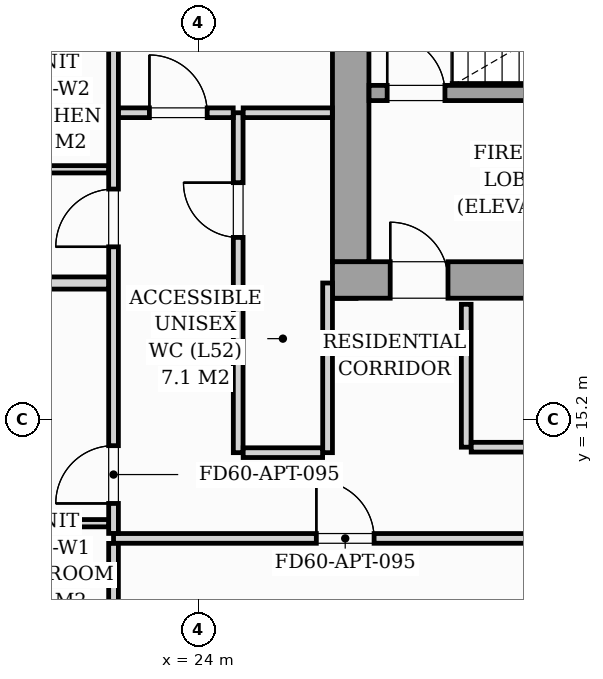
"""IFC4 building model, lengths in metres.
Left out: names, types, materials, properties, quantities, classifications, styles, units other than length and angle.
Written with IfcOpenShell. Run it as: python <this file> out.ifc"""

import sys

from ifc_helpers import new_model, si_unit, direction, frame, frame_2d, origin, origin_2d, place, context, subcontext, project, spatial, rectangle, i_section, extrude, source, transform, mapped, element, fill, save


model = new_model("IFC4")
c1 = context("Model", 3, precision=1e-05, world=origin(), true_north=direction((0.0, 1.0)))
c2 = subcontext(c1, "Body", "Model", "MODEL_VIEW")
j1 = project(units=[si_unit("LENGTHUNIT", "METRE"), si_unit("PLANEANGLEUNIT", "RADIAN")], contexts=[c1])
p1 = place(None, origin())
s1 = spatial("IfcSite", under=j1, at=p1, CompositionType="ELEMENT")
p2 = place(p1, origin())
s2 = spatial("IfcBuilding", under=s1, at=p2, CompositionType="ELEMENT")
p3 = place(p2, frame((0.0, 0.0, 182.6)))
s3 = spatial("IfcBuildingStorey", under=s2, at=p3, CompositionType="ELEMENT", Elevation=182.6)
m1 = source(origin(), c2, "Body", "SweptSolid", [
    extrude(i_section(OverallWidth=0.416, OverallDepth=0.446, WebThickness=0.039, FlangeThickness=0.063, FilletRadius=0.018, at=origin_2d()), origin(), (0.0, 0.0, 1.0), 3.196),
])
p4 = place(p3, frame((26.4, 17.4, 0.002), z_axis=(0.0, 0.0, 1.0), x_axis=(1.0, 0.0, 0.0)))
e1 = element("IfcColumn", 1, at=p4, inside=s3, PredefinedType="PILASTER", context=c2, shape_type="MappedRepresentation", body=[
    mapped(m1, transform((0.0, 0.0, 0.0), scale=1.0)),
])
p5 = place(p3, frame((26.2, 17.5, 0.0), z_axis=(0.0, 0.0, 1.0), x_axis=(1.0, 0.0, 0.0)))
e2 = element("IfcWall", 2, at=p5, inside=s3, PredefinedType="SHEAR", context=c2, shape_type="SweptSolid", body=[
    extrude(rectangle(XDim=19.6, YDim=0.6, at=frame_2d((9.8, 0.0))), origin(), (0.0, 0.0, 1.0), 3.2),
])
p6 = place(p5, frame((0.95, 0.0, 0.0)))
e3 = element("IfcOpeningElement", 3, at=p6, cuts=e2, PredefinedType="OPENING", context=c2, shape_type="SweptSolid", body=[
    extrude(rectangle(XDim=0.95, YDim=2.06, at=frame_2d((0.475, 1.03))), frame((0.0, 0.31, 0.0), z_axis=(0.0, -1.0, 0.0), x_axis=(1.0, 0.0, 0.0)), (0.0, 0.0, 1.0), 0.62),
])
p7 = place(p5, frame((9.38, 0.0, 0.0)))
e4 = element("IfcOpeningElement", 4, at=p7, cuts=e2, PredefinedType="OPENING", context=c2, shape_type="SweptSolid", body=[
    extrude(rectangle(XDim=0.85, YDim=2.0, at=frame_2d((0.425, 1.0))), frame((0.0, 0.31, 0.0), z_axis=(0.0, -1.0, 0.0), x_axis=(1.0, 0.0, 0.0)), (0.0, 0.0, 1.0), 0.62),
])
p8 = place(p5, frame((17.55, 0.0, 0.0)))
e5 = element("IfcOpeningElement", 5, at=p8, cuts=e2, PredefinedType="OPENING", context=c2, shape_type="SweptSolid", body=[
    extrude(rectangle(XDim=0.95, YDim=2.06, at=frame_2d((0.475, 1.03))), frame((0.0, 0.31, 0.0), z_axis=(0.0, -1.0, 0.0), x_axis=(1.0, 0.0, 0.0)), (0.0, 0.0, 1.0), 0.62),
])
p9 = place(p3, frame((26.5, 17.802, 0.0), z_axis=(0.0, 0.0, 1.0), x_axis=(0.0, 1.0, 0.0)))
e6 = element("IfcWall", 6, at=p9, inside=s3, PredefinedType="SHEAR", context=c2, shape_type="SweptSolid", body=[
    extrude(rectangle(XDim=5.796, YDim=0.6, at=frame_2d((2.898, 0.0))), origin(), (0.0, 0.0, 1.0), 3.2),
])
p10 = place(p3, frame((26.802, 20.575, 0.0), z_axis=(0.0, 0.0, 1.0), x_axis=(1.0, 0.0, 0.0)))
e7 = element("IfcWall", 7, at=p10, inside=s3, PredefinedType="SOLIDWALL", context=c2, shape_type="SweptSolid", body=[
    extrude(rectangle(XDim=8.148, YDim=0.25, at=frame_2d((4.074, 0.0))), origin(), (0.0, 0.0, 1.0), 3.2),
])
p11 = place(p10, frame((0.298, 0.0, 0.0)))
e8 = element("IfcOpeningElement", 8, at=p11, cuts=e7, PredefinedType="OPENING", context=c2, shape_type="SweptSolid", body=[
    extrude(rectangle(XDim=0.95, YDim=2.06, at=frame_2d((0.475, 1.03))), frame((0.0, 0.135, 0.0), z_axis=(0.0, -1.0, 0.0), x_axis=(1.0, 0.0, 0.0)), (0.0, 0.0, 1.0), 0.27),
])
p12 = place(p3, frame((28.4, 14.75, 0.0), z_axis=(0.0, 0.0, 1.0), x_axis=(0.0, 1.0, 0.0)))
e9 = element("IfcWall", 9, at=p12, inside=s3, PredefinedType="PARTITIONING", context=c2, shape_type="SweptSolid", body=[
    extrude(rectangle(XDim=2.35, YDim=0.16, at=frame_2d((1.175, 0.0))), origin(), (0.0, 0.0, 1.0), 2.94),
])
p13 = place(p3, frame((28.482, 14.75, 0.0), z_axis=(0.0, 0.0, 1.0), x_axis=(1.0, 0.0, 0.0)))
e10 = element("IfcWall", 10, at=p13, inside=s3, PredefinedType="PARTITIONING", context=c2, shape_type="SweptSolid", body=[
    extrude(rectangle(XDim=4.516, YDim=0.16, at=frame_2d((2.258, 0.0))), origin(), (0.0, 0.0, 1.0), 2.94),
])
p14 = place(p13, frame((1.868, 0.0, 0.0)))
e11 = element("IfcOpeningElement", 11, at=p14, cuts=e10, PredefinedType="OPENING", context=c2, shape_type="SweptSolid", body=[
    extrude(rectangle(XDim=0.8, YDim=2.05, at=frame_2d((0.4, 1.025))), frame((0.0, 0.09, 0.0), z_axis=(0.0, -1.0, 0.0), x_axis=(1.0, 0.0, 0.0)), (0.0, 0.0, 1.0), 0.18),
])
p15 = place(p3, frame((22.6, 13.25, 0.0), z_axis=(0.0, 0.0, 1.0), x_axis=(1.0, 0.0, 0.0)))
e12 = element("IfcWall", 12, at=p15, inside=s3, PredefinedType="PARTITIONING", context=c2, shape_type="SweptSolid", body=[
    extrude(rectangle(XDim=23.28, YDim=0.16, at=frame_2d((11.64, 0.0))), origin(), (0.0, 0.0, 1.0), 2.94),
])
p16 = place(p15, frame((3.335, 0.0, 0.0)))
e13 = element("IfcOpeningElement", 13, at=p16, cuts=e12, PredefinedType="OPENING", context=c2, shape_type="SweptSolid", body=[
    extrude(rectangle(XDim=0.95, YDim=2.06, at=frame_2d((0.475, 1.03))), frame((0.0, 0.09, 0.0), z_axis=(0.0, -1.0, 0.0), x_axis=(1.0, 0.0, 0.0)), (0.0, 0.0, 1.0), 0.18),
])
p17 = place(p15, frame((15.096, 0.0, 0.0)))
e14 = element("IfcOpeningElement", 14, at=p17, cuts=e12, PredefinedType="OPENING", context=c2, shape_type="SweptSolid", body=[
    extrude(rectangle(XDim=0.95, YDim=2.06, at=frame_2d((0.475, 1.03))), frame((0.0, 0.09, 0.0), z_axis=(0.0, -1.0, 0.0), x_axis=(1.0, 0.0, 0.0)), (0.0, 0.0, 1.0), 0.18),
])
p18 = place(p3, frame((22.6, 6.922, 0.0), z_axis=(0.0, 0.0, 1.0), x_axis=(0.0, 1.0, 0.0)))
e15 = element("IfcWall", 15, at=p18, inside=s3, PredefinedType="PARTITIONING", context=c2, shape_type="SweptSolid", body=[
    extrude(rectangle(XDim=6.246, YDim=0.16, at=frame_2d((3.123, 0.0))), origin(), (0.0, 0.0, 1.0), 2.94),
])
p19 = place(p3, frame((22.6, 13.332, 0.0), z_axis=(0.0, 0.0, 1.0), x_axis=(0.0, 1.0, 0.0)))
e16 = element("IfcWall", 16, at=p19, inside=s3, PredefinedType="PARTITIONING", context=c2, shape_type="SweptSolid", body=[
    extrude(rectangle(XDim=11.549, YDim=0.16, at=frame_2d((5.774, 0.0))), origin(), (0.0, 0.0, 1.0), 2.94),
])
p20 = place(p19, frame((0.493, 0.0, 0.0)))
e17 = element("IfcOpeningElement", 17, at=p20, cuts=e16, PredefinedType="OPENING", context=c2, shape_type="SweptSolid", body=[
    extrude(rectangle(XDim=0.95, YDim=2.06, at=frame_2d((0.475, 1.03))), frame((0.0, 0.09, 0.0), z_axis=(0.0, -1.0, 0.0), x_axis=(1.0, 0.0, 0.0)), (0.0, 0.0, 1.0), 0.18),
])
p21 = place(p19, frame((4.713, 0.0, 0.0)))
e18 = element("IfcOpeningElement", 18, at=p21, cuts=e16, PredefinedType="OPENING", context=c2, shape_type="SweptSolid", body=[
    extrude(rectangle(XDim=0.95, YDim=2.06, at=frame_2d((0.475, 1.03))), frame((0.0, 0.09, 0.0), z_axis=(0.0, -1.0, 0.0), x_axis=(1.0, 0.0, 0.0)), (0.0, 0.0, 1.0), 0.18),
])
p22 = place(p3, frame((13.667, 17.45, 0.0), z_axis=(0.0, 0.0, 1.0), x_axis=(1.0, 0.0, 0.0)))
e19 = element("IfcWall", 19, at=p22, inside=s3, PredefinedType="PARTITIONING", context=c2, shape_type="SweptSolid", body=[
    extrude(rectangle(XDim=8.851, YDim=0.2, at=frame_2d((4.425, 0.0))), origin(), (0.0, 0.0, 1.0), 2.94),
])
for number, where, z_axis, x_axis in (
    (20, (20.262, 13.5, 0.0), (0.0, 0.0, 1.0), (1.0, 0.0, 0.0)),
    (21, (20.262, 19.32, 0.0), (0.0, 0.0, 1.0), (1.0, 0.0, 0.0)),
):
    element("IfcWall", number, at=place(p3, frame(where, z_axis=z_axis, x_axis=x_axis)), inside=s3, PredefinedType="PARTITIONING", context=c2, shape_type="SweptSolid", body=[
        extrude(rectangle(XDim=2.256, YDim=0.12, at=frame_2d((1.128, 0.0))), origin(), (0.0, 0.0, 1.0), 2.94),
    ])
p23 = place(p3, frame((24.65, 14.66, 0.0), z_axis=(0.0, 0.0, 1.0), x_axis=(0.0, 1.0, 0.0)))
e22 = element("IfcWall", 22, at=p23, inside=s3, PredefinedType="PARTITIONING", context=c2, shape_type="SweptSolid", body=[
    extrude(rectangle(XDim=5.59, YDim=0.16, at=frame_2d((2.795, 0.0))), origin(), (0.0, 0.0, 1.0), 2.94),
])
p24 = place(p23, frame((3.54, 0.0, 0.0)))
e23 = element("IfcOpeningElement", 23, at=p24, cuts=e22, PredefinedType="OPENING", context=c2, shape_type="SweptSolid", body=[
    extrude(rectangle(XDim=0.9, YDim=2.05, at=frame_2d((0.45, 1.025))), frame((0.0, 0.09, 0.0), z_axis=(0.0, -1.0, 0.0), x_axis=(1.0, 0.0, 0.0)), (0.0, 0.0, 1.0), 0.18),
])
p25 = place(p3, frame((22.682, 20.25, 0.0), z_axis=(0.0, 0.0, 1.0), x_axis=(1.0, 0.0, 0.0)))
e24 = element("IfcWall", 24, at=p25, inside=s3, PredefinedType="PARTITIONING", context=c2, shape_type="SweptSolid", body=[
    extrude(rectangle(XDim=1.886, YDim=0.16, at=frame_2d((0.943, 0.0))), origin(), (0.0, 0.0, 1.0), 2.94),
])
p26 = place(p25, frame((0.508, 0.0, 0.0)))
e25 = element("IfcOpeningElement", 25, at=p26, cuts=e24, PredefinedType="OPENING", context=c2, shape_type="SweptSolid", body=[
    extrude(rectangle(XDim=0.95, YDim=2.06, at=frame_2d((0.475, 1.03))), frame((0.0, 0.09, 0.0), z_axis=(0.0, -1.0, 0.0), x_axis=(1.0, 0.0, 0.0)), (0.0, 0.0, 1.0), 0.18),
])
p27 = place(p3, frame((24.732, 20.25, 0.0), z_axis=(0.0, 0.0, 1.0), x_axis=(1.0, 0.0, 0.0)))
e26 = element("IfcWall", 26, at=p27, inside=s3, PredefinedType="PARTITIONING", context=c2, shape_type="SweptSolid", body=[
    extrude(rectangle(XDim=1.466, YDim=0.16, at=frame_2d((0.733, 0.0))), origin(), (0.0, 0.0, 1.0), 2.94),
])
p28 = place(p3, frame((26.12, 14.66, 0.0), z_axis=(0.0, 0.0, 1.0), x_axis=(0.0, 1.0, 0.0)))
e27 = element("IfcWall", 27, at=p28, inside=s3, PredefinedType="PARTITIONING", context=c2, shape_type="SweptSolid", body=[
    extrude(rectangle(XDim=2.79, YDim=0.16, at=frame_2d((1.395, 0.0))), origin(), (0.0, 0.0, 1.0), 2.94),
])
p29 = place(p3, frame((24.732, 14.66, 0.0), z_axis=(0.0, 0.0, 1.0), x_axis=(1.0, 0.0, 0.0)))
e28 = element("IfcWall", 28, at=p29, inside=s3, PredefinedType="PARTITIONING", context=c2, shape_type="SweptSolid", body=[
    extrude(rectangle(XDim=1.306, YDim=0.16, at=frame_2d((0.653, 0.0))), origin(), (0.0, 0.0, 1.0), 2.94),
])
m2 = source(origin(), c2, "Body", "SweptSolid", [
    extrude(rectangle(XDim=0.95, YDim=2.06, at=frame_2d((0.475, 1.03))), frame((0.0, 0.025, 0.0), z_axis=(0.0, -1.0, 0.0), x_axis=(1.0, 0.0, 0.0)), (0.0, 0.0, 1.0), 0.05),
])
p30 = place(p6, origin())
e29 = element("IfcDoor", 29, at=p30, inside=s3, OperationType="SINGLE_SWING_LEFT", PredefinedType="DOOR", context=c2, shape_type="MappedRepresentation", body=[
    mapped(m2, transform((0.0, 0.0, 0.0), scale=1.0)),
])
fill(e3, e29)
p31 = place(p11, origin())
e30 = element("IfcDoor", 30, at=p31, inside=s3, OperationType="SINGLE_SWING_LEFT", PredefinedType="DOOR", context=c2, shape_type="MappedRepresentation", body=[
    mapped(m2, transform((0.0, 0.0, 0.0), scale=1.0)),
])
fill(e8, e30)
m3 = source(origin(), c2, "Body", "SweptSolid", [
    extrude(rectangle(XDim=0.95, YDim=2.06, at=frame_2d((0.475, 1.03))), frame((0.0, 0.025, 0.0), z_axis=(0.0, -1.0, 0.0), x_axis=(1.0, 0.0, 0.0)), (0.0, 0.0, 1.0), 0.05),
])
p32 = place(p16, origin())
e31 = element("IfcDoor", 31, at=p32, inside=s3, OperationType="SINGLE_SWING_LEFT", PredefinedType="DOOR", context=c2, shape_type="MappedRepresentation", body=[
    mapped(m3, transform((0.0, 0.0, 0.0), scale=1.0)),
])
fill(e13, e31)
p33 = place(p20, origin())
e32 = element("IfcDoor", 32, at=p33, inside=s3, OperationType="SINGLE_SWING_LEFT", PredefinedType="DOOR", context=c2, shape_type="MappedRepresentation", body=[
    mapped(m3, transform((0.0, 0.0, 0.0), scale=1.0)),
])
fill(e17, e32)
p34 = place(p21, origin())
e33 = element("IfcDoor", 33, at=p34, inside=s3, OperationType="SINGLE_SWING_LEFT", PredefinedType="DOOR", context=c2, shape_type="MappedRepresentation", body=[
    mapped(m3, transform((0.0, 0.0, 0.0), scale=1.0)),
])
fill(e18, e33)
m4 = source(origin(), c2, "Body", "SweptSolid", [
    extrude(rectangle(XDim=0.9, YDim=2.05, at=frame_2d((0.45, 1.025))), frame((0.0, 0.025, 0.0), z_axis=(0.0, -1.0, 0.0), x_axis=(1.0, 0.0, 0.0)), (0.0, 0.0, 1.0), 0.05),
])
p35 = place(p24, origin())
e34 = element("IfcDoor", 34, at=p35, inside=s3, OperationType="SINGLE_SWING_RIGHT", PredefinedType="DOOR", context=c2, shape_type="MappedRepresentation", body=[
    mapped(m4, transform((0.0, 0.0, 0.0), scale=1.0)),
])
fill(e23, e34)
p36 = place(p26, origin())
e35 = element("IfcDoor", 35, at=p36, inside=s3, OperationType="SINGLE_SWING_LEFT", PredefinedType="DOOR", context=c2, shape_type="MappedRepresentation", body=[
    mapped(m3, transform((0.0, 0.0, 0.0), scale=1.0)),
])
fill(e25, e35)
save(model, sys.argv[1])
